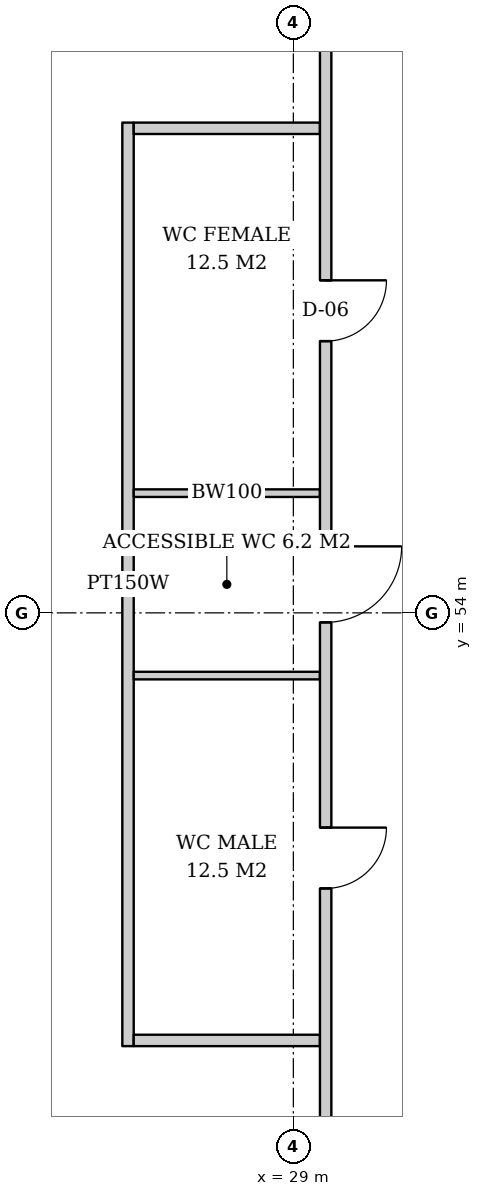
"""IFC4 building model, lengths in metres.
Left out: names, types, materials, properties, quantities, classifications, styles, units other than length and angle.
Written with IfcOpenShell. Run it as: python <this file> out.ifc"""

import sys

from ifc_helpers import new_model, si_unit, direction, frame, frame_2d, origin, place, context, subcontext, project, spatial, rectangle, extrude, element, fill, save


model = new_model("IFC4")
c1 = context("Model", 3, precision=1e-05, world=origin(), true_north=direction((0.0, 1.0)))
c2 = subcontext(c1, "Body", "Model", "MODEL_VIEW")
j1 = project(units=[si_unit("LENGTHUNIT", "METRE"), si_unit("PLANEANGLEUNIT", "RADIAN")], contexts=[c1])
p1 = place(None, origin())
s1 = spatial("IfcSite", under=j1, at=p1, CompositionType="ELEMENT")
p2 = place(p1, origin())
s2 = spatial("IfcBuilding", under=s1, at=p2, CompositionType="ELEMENT")
p3 = place(p2, frame((0.0, 0.0, 51.4)))
s3 = spatial("IfcBuildingStorey", under=s2, at=p3, CompositionType="ELEMENT", Elevation=51.4)
p4 = place(p3, frame((26.825, 60.45, 0.0), z_axis=(0.0, 0.0, 1.0), x_axis=(0.0, -1.0, 0.0)))
e1 = element("IfcWall", 1, at=p4, inside=s3, PredefinedType="PARTITIONING", context=c2, shape_type="SweptSolid", body=[
    extrude(rectangle(XDim=12.15, YDim=0.15, at=frame_2d((6.075, 0.0))), origin(), (0.0, 0.0, 1.0), 2.612),
])
p5 = place(p3, frame((29.35, 60.375, 0.0), z_axis=(0.0, 0.0, 1.0), x_axis=(-1.0, 0.0, 0.0)))
e2 = element("IfcWall", 2, at=p5, inside=s3, PredefinedType="PARTITIONING", context=c2, shape_type="SweptSolid", body=[
    extrude(rectangle(XDim=2.45, YDim=0.15, at=frame_2d((1.225, 0.0))), origin(), (0.0, 0.0, 1.0), 3.62),
])
for number, where, z_axis, x_axis in (
    (3, (29.35, 55.575, 0.0), (0.0, 0.0, 1.0), (-1.0, 0.0, 0.0)),
    (4, (29.35, 53.175, 0.0), (0.0, 0.0, 1.0), (-1.0, 0.0, 0.0)),
):
    element("IfcWall", number, at=place(p3, frame(where, z_axis=z_axis, x_axis=x_axis)), inside=s3, PredefinedType="SOLIDWALL", context=c2, shape_type="SweptSolid", body=[
        extrude(rectangle(XDim=2.45, YDim=0.1, at=frame_2d((1.225, 0.0))), origin(), (0.0, 0.0, 1.0), 3.62),
    ])
p6 = place(p3, frame((29.35, 48.375, 0.0), z_axis=(0.0, 0.0, 1.0), x_axis=(-1.0, 0.0, 0.0)))
e5 = element("IfcWall", 5, at=p6, inside=s3, PredefinedType="PARTITIONING", context=c2, shape_type="SweptSolid", body=[
    extrude(rectangle(XDim=2.45, YDim=0.15, at=frame_2d((1.225, 0.0))), origin(), (0.0, 0.0, 1.0), 3.62),
])
p7 = place(p3, frame((29.425, 61.65, 0.0), z_axis=(0.0, 0.0, 1.0), x_axis=(0.0, -1.0, 0.0)))
e6 = element("IfcWall", 6, at=p7, inside=s3, PredefinedType="PARTITIONING", context=c2, shape_type="SweptSolid", body=[
    extrude(rectangle(XDim=31.15, YDim=0.15, at=frame_2d((15.575, 0.0))), origin(), (0.0, 0.0, 1.0), 2.612),
])
p8 = place(p7, frame((3.275, 0.0, 0.0)))
e7 = element("IfcOpeningElement", 7, at=p8, cuts=e6, PredefinedType="OPENING", context=c2, shape_type="SweptSolid", body=[
    extrude(rectangle(XDim=0.8, YDim=2.1, at=frame_2d((0.4, 1.05))), frame((0.0, 0.085, 0.0), z_axis=(0.0, -1.0, 0.0), x_axis=(1.0, 0.0, 0.0)), (0.0, 0.0, 1.0), 0.17),
])
p9 = place(p7, frame((6.775, 0.0, 0.0)))
e8 = element("IfcOpeningElement", 8, at=p9, cuts=e6, PredefinedType="OPENING", context=c2, shape_type="SweptSolid", body=[
    extrude(rectangle(XDim=1.0, YDim=2.1, at=frame_2d((0.5, 1.05))), frame((0.0, 0.085, 0.0), z_axis=(0.0, -1.0, 0.0), x_axis=(1.0, 0.0, 0.0)), (0.0, 0.0, 1.0), 0.17),
])
p10 = place(p7, frame((10.475, 0.0, 0.0)))
e9 = element("IfcOpeningElement", 9, at=p10, cuts=e6, PredefinedType="OPENING", context=c2, shape_type="SweptSolid", body=[
    extrude(rectangle(XDim=0.8, YDim=2.1, at=frame_2d((0.4, 1.05))), frame((0.0, 0.085, 0.0), z_axis=(0.0, -1.0, 0.0), x_axis=(1.0, 0.0, 0.0)), (0.0, 0.0, 1.0), 0.17),
])
p11 = place(p8, origin())
e10 = element("IfcDoor", 10, at=p11, inside=s3, OperationType="SINGLE_SWING_LEFT", PredefinedType="DOOR", context=c2, shape_type="SweptSolid", body=[
    extrude(rectangle(XDim=0.8, YDim=2.1, at=frame_2d((0.4, 1.05))), frame((0.0, 0.025, 0.0), z_axis=(0.0, -1.0, 0.0), x_axis=(1.0, 0.0, 0.0)), (0.0, 0.0, 1.0), 0.05),
])
fill(e7, e10)
p12 = place(p9, origin())
e11 = element("IfcDoor", 11, at=p12, inside=s3, OperationType="SINGLE_SWING_LEFT", PredefinedType="DOOR", context=c2, shape_type="SweptSolid", body=[
    extrude(rectangle(XDim=1.0, YDim=2.1, at=frame_2d((0.5, 1.05))), frame((0.0, 0.025, 0.0), z_axis=(0.0, -1.0, 0.0), x_axis=(1.0, 0.0, 0.0)), (0.0, 0.0, 1.0), 0.05),
])
fill(e8, e11)
p13 = place(p10, origin())
e12 = element("IfcDoor", 12, at=p13, inside=s3, OperationType="SINGLE_SWING_LEFT", PredefinedType="DOOR", context=c2, shape_type="SweptSolid", body=[
    extrude(rectangle(XDim=0.8, YDim=2.1, at=frame_2d((0.4, 1.05))), frame((0.0, 0.025, 0.0), z_axis=(0.0, -1.0, 0.0), x_axis=(1.0, 0.0, 0.0)), (0.0, 0.0, 1.0), 0.05),
])
fill(e9, e12)
save(model, sys.argv[1])
